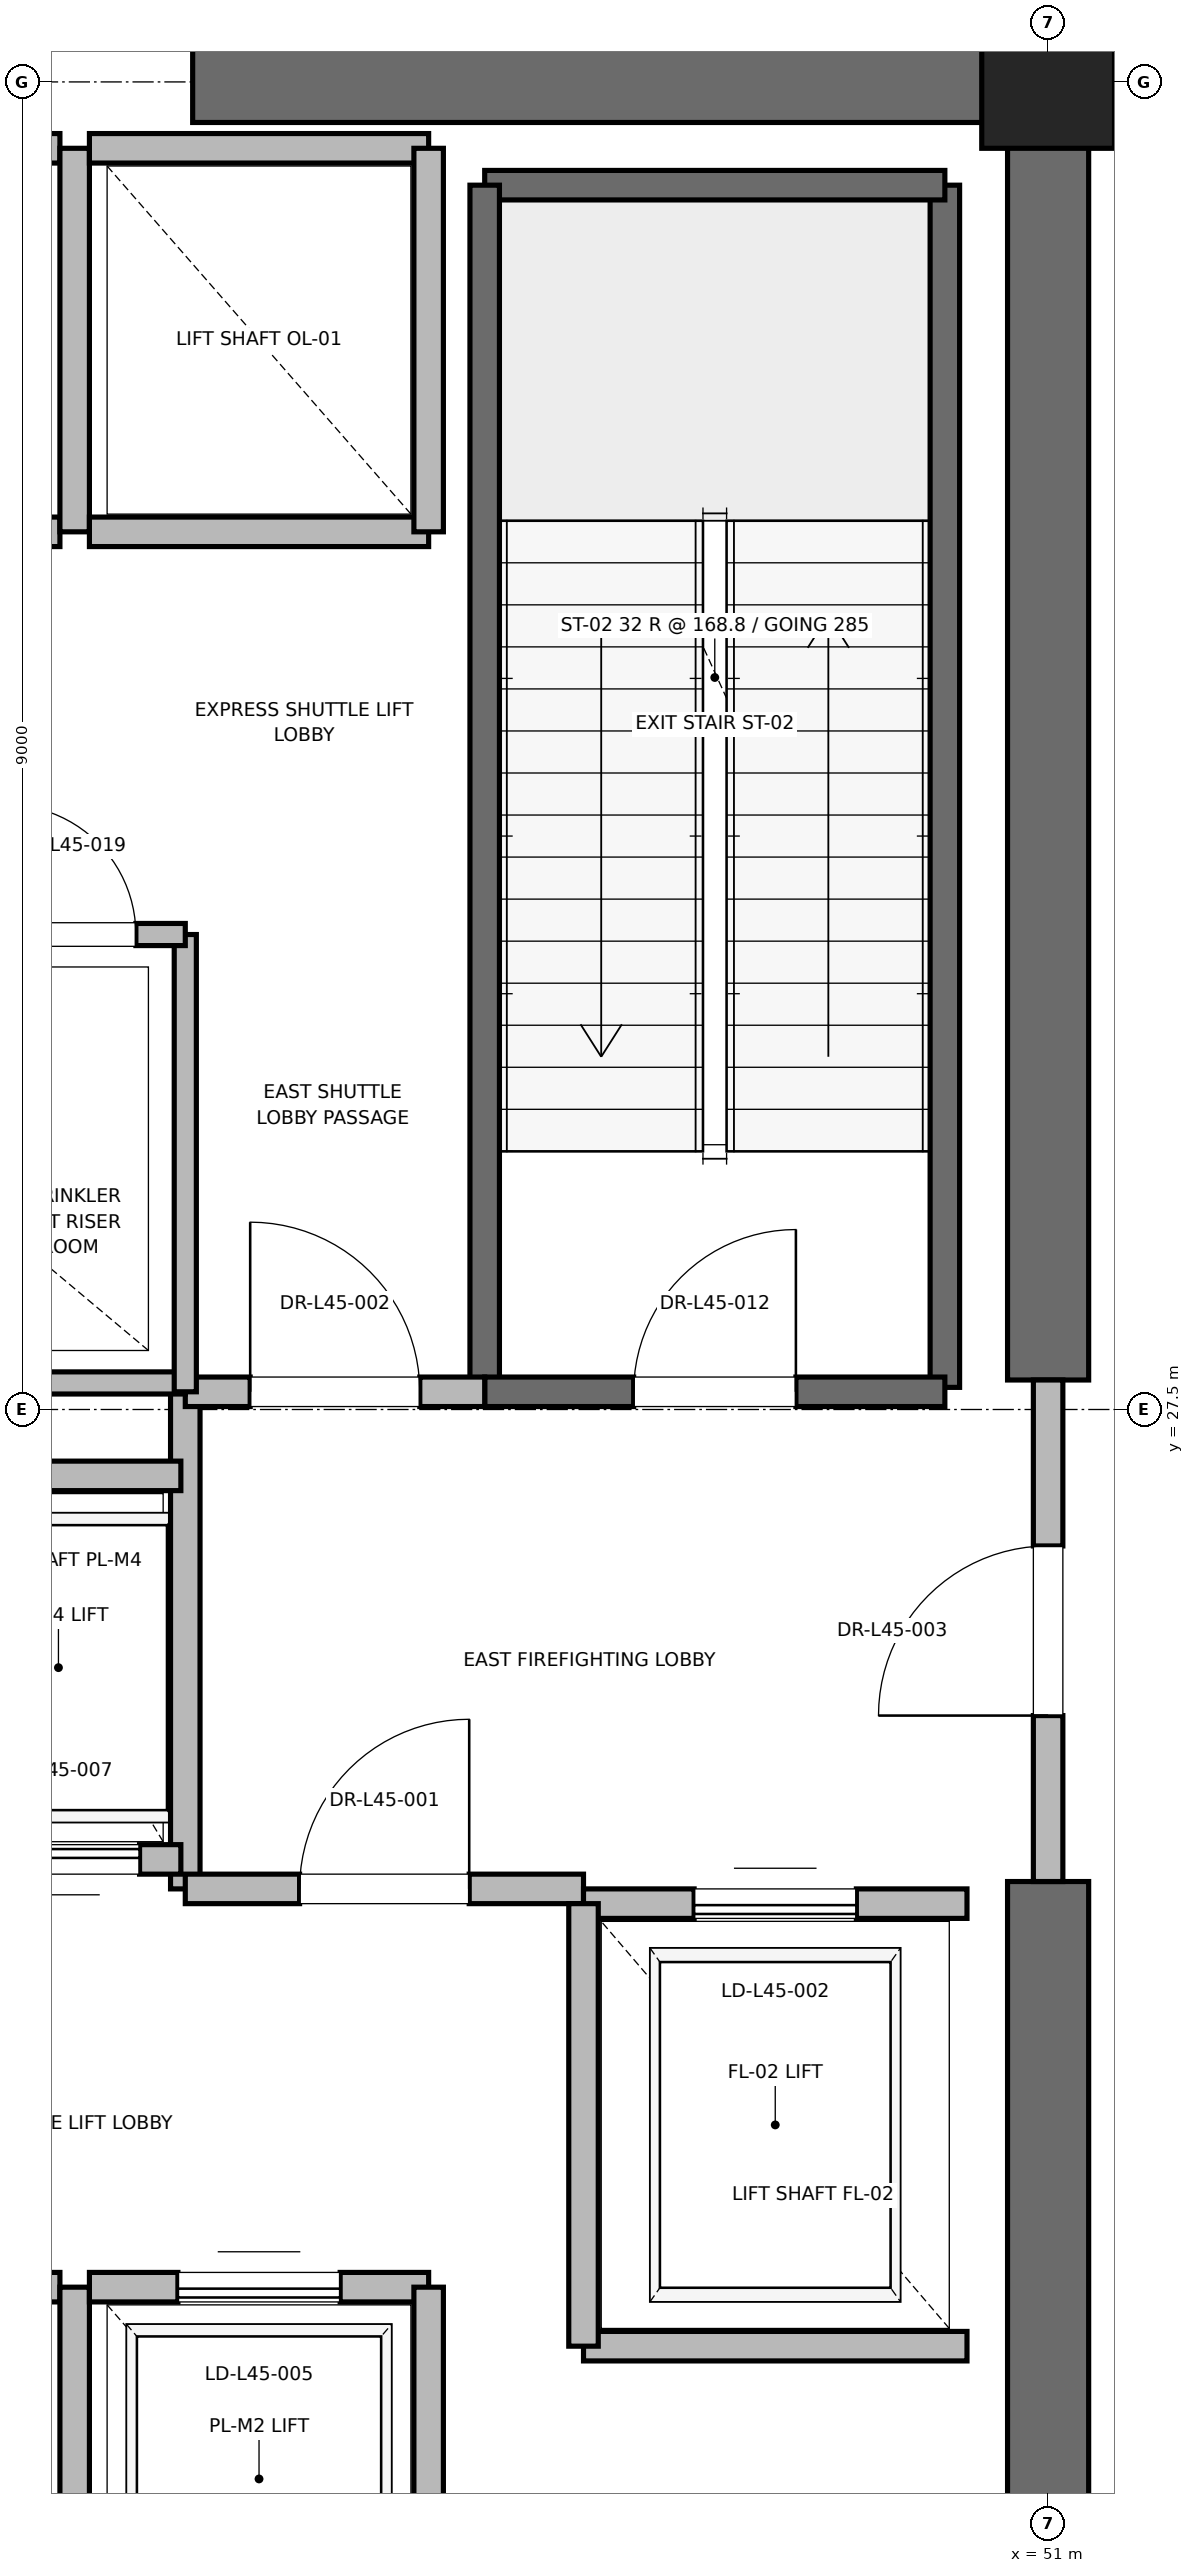
"""IFC4 building model, lengths in metres.
Left out: names, types, materials, properties, quantities, classifications, styles, units other than length and angle.
Written with IfcOpenShell. Run it as: python <this file> out.ifc"""

import sys

from ifc_helpers import new_model, si_unit, direction, frame, frame_2d, origin, origin_2d, place, context, subcontext, project, spatial, rectangle, extrude, element, fill, save


model = new_model("IFC4")
c1 = context("Model", 3, precision=1e-05, world=origin(), true_north=direction((0.0, 1.0)))
c2 = subcontext(c1, "Body", "Model", "MODEL_VIEW")
j1 = project(units=[si_unit("LENGTHUNIT", "METRE"), si_unit("PLANEANGLEUNIT", "RADIAN")], contexts=[c1])
p1 = place(None, origin())
s1 = spatial("IfcSite", under=j1, at=p1, CompositionType="ELEMENT")
p2 = place(p1, origin())
s2 = spatial("IfcBuilding", under=s1, at=p2, CompositionType="ELEMENT")
p3 = place(p2, frame((0.0, 0.0, 194.8)))
s3 = spatial("IfcBuildingStorey", under=s2, at=p3, CompositionType="ELEMENT", Elevation=194.8)
p4 = place(p3, frame((51.0, 36.5, 0.0), z_axis=(0.0, 0.0, 1.0), x_axis=(1.0, 0.0, 0.0)))
e1 = element("IfcColumn", 1, at=p4, inside=s3, PredefinedType="PILASTER", context=c2, shape_type="SweptSolid", body=[
    extrude(rectangle(XDim=0.9, YDim=0.9, at=origin_2d()), origin(), (0.0, 0.0, 1.0), 5.4),
])
for number, where, z_axis, x_axis in (
    (2, (45.2, 36.5, 0.0), (0.0, 0.0, 1.0), (1.0, 0.0, 0.0)),
    (3, (51.0, 18.5, 0.0), (0.0, 0.0, 1.0), (0.0, 1.0, 0.0)),
):
    element("IfcWall", number, at=place(p3, frame(where, z_axis=z_axis, x_axis=x_axis)), inside=s3, PredefinedType="SHEAR", context=c2, shape_type="SweptSolid", body=[
        extrude(rectangle(XDim=5.8, YDim=0.55, at=frame_2d((2.9, 0.0))), origin(), (0.0, 0.0, 1.0), 5.1),
    ])
p5 = place(p3, frame((51.0, 27.7, 0.0), z_axis=(0.0, 0.0, 1.0), x_axis=(0.0, 1.0, 0.0)))
e4 = element("IfcWall", 4, at=p5, inside=s3, PredefinedType="SHEAR", context=c2, shape_type="SweptSolid", body=[
    extrude(rectangle(XDim=8.8, YDim=0.55, at=frame_2d((4.4, 0.0))), origin(), (0.0, 0.0, 1.0), 5.1),
])
p6 = place(p3, frame((50.3, 27.65, 0.0), z_axis=(0.0, 0.0, 1.0), x_axis=(0.0, 1.0, 0.0)))
e5 = element("IfcWall", 5, at=p6, inside=s3, PredefinedType="SOLIDWALL", context=c2, shape_type="SweptSolid", body=[
    extrude(rectangle(XDim=8.15, YDim=0.2, at=frame_2d((4.075, 0.0))), origin(), (0.0, 0.0, 1.0), 5.1),
])
p7 = place(p3, frame((47.18, 35.8, 0.0), z_axis=(0.0, 0.0, 1.0), x_axis=(1.0, 0.0, 0.0)))
e6 = element("IfcWall", 6, at=p7, inside=s3, PredefinedType="SOLIDWALL", context=c2, shape_type="SweptSolid", body=[
    extrude(rectangle(XDim=3.12, YDim=0.2, at=frame_2d((1.56, 0.0))), origin(), (0.0, 0.0, 1.0), 5.1),
])
p8 = place(p3, frame((47.18, 27.62, 0.0), z_axis=(0.0, 0.0, 1.0), x_axis=(0.0, 1.0, 0.0)))
e7 = element("IfcWall", 7, at=p8, inside=s3, PredefinedType="SOLIDWALL", context=c2, shape_type="SweptSolid", body=[
    extrude(rectangle(XDim=8.18, YDim=0.2, at=frame_2d((4.09, 0.0))), origin(), (0.0, 0.0, 1.0), 5.1),
])
p9 = place(p3, frame((47.18, 27.62, 0.0), z_axis=(0.0, 0.0, 1.0), x_axis=(1.0, 0.0, 0.0)))
e8 = element("IfcWall", 8, at=p9, inside=s3, PredefinedType="SOLIDWALL", context=c2, shape_type="SweptSolid", body=[
    extrude(rectangle(XDim=3.12, YDim=0.2, at=frame_2d((1.56, 0.0))), origin(), (0.0, 0.0, 1.0), 5.1),
])
p10 = place(p9, frame((1.01, 0.0, 0.0)))
e9 = element("IfcOpeningElement", 9, at=p10, cuts=e8, PredefinedType="OPENING", context=c2, shape_type="SweptSolid", body=[
    extrude(rectangle(XDim=1.1, YDim=2.15, at=frame_2d((0.55, 1.075))), frame((0.0, 0.1, 0.0), z_axis=(0.0, -1.0, 0.0), x_axis=(1.0, 0.0, 0.0)), (0.0, 0.0, 1.0), 0.2),
])
p11 = place(p3, frame((45.15, 24.25, 0.0), z_axis=(0.0, 0.0, 1.0), x_axis=(0.0, 1.0, 0.0)))
e10 = element("IfcWall", 10, at=p11, inside=s3, PredefinedType="PARTITIONING", context=c2, shape_type="SweptSolid", body=[
    extrude(rectangle(XDim=3.37, YDim=0.2, at=frame_2d((1.685, 0.0))), origin(), (0.0, 0.0, 1.0), 5.1),
])
p12 = place(p3, frame((45.15, 24.25, 0.0), z_axis=(0.0, 0.0, 1.0), x_axis=(1.0, 0.0, 0.0)))
e11 = element("IfcWall", 11, at=p12, inside=s3, PredefinedType="PARTITIONING", context=c2, shape_type="SweptSolid", body=[
    extrude(rectangle(XDim=2.7, YDim=0.2, at=frame_2d((1.35, 0.0))), origin(), (0.0, 0.0, 1.0), 5.1),
])
p13 = place(p12, frame((0.775, 0.0, 0.0)))
e12 = element("IfcOpeningElement", 12, at=p13, cuts=e11, PredefinedType="OPENING", context=c2, shape_type="SweptSolid", body=[
    extrude(rectangle(XDim=1.15, YDim=2.2, at=frame_2d((0.575, 1.1))), frame((0.0, 0.1, 0.0), z_axis=(0.0, -1.0, 0.0), x_axis=(1.0, 0.0, 0.0)), (0.0, 0.0, 1.0), 0.2),
])
p14 = place(p3, frame((45.15, 27.62, 0.0), z_axis=(0.0, 0.0, 1.0), x_axis=(1.0, 0.0, 0.0)))
e13 = element("IfcWall", 13, at=p14, inside=s3, PredefinedType="PARTITIONING", context=c2, shape_type="SweptSolid", body=[
    extrude(rectangle(XDim=2.03, YDim=0.2, at=frame_2d((1.015, 0.0))), origin(), (0.0, 0.0, 1.0), 5.1),
])
p15 = place(p14, frame((0.44, 0.0, 0.0)))
e14 = element("IfcOpeningElement", 14, at=p15, cuts=e13, PredefinedType="OPENING", context=c2, shape_type="SweptSolid", body=[
    extrude(rectangle(XDim=1.15, YDim=2.2, at=frame_2d((0.575, 1.1))), frame((0.0, 0.1, 0.0), z_axis=(0.0, -1.0, 0.0), x_axis=(1.0, 0.0, 0.0)), (0.0, 0.0, 1.0), 0.2),
])
p16 = place(p3, frame((51.0, 24.3, 0.0), z_axis=(0.0, 0.0, 1.0), x_axis=(0.0, 1.0, 0.0)))
e15 = element("IfcWall", 15, at=p16, inside=s3, PredefinedType="PARTITIONING", context=c2, shape_type="SweptSolid", body=[
    extrude(rectangle(XDim=3.4, YDim=0.2, at=frame_2d((1.7, 0.0))), origin(), (0.0, 0.0, 1.0), 4.08),
])
p17 = place(p16, frame((1.125, 0.0, 0.0)))
e16 = element("IfcOpeningElement", 16, at=p17, cuts=e15, PredefinedType="OPENING", context=c2, shape_type="SweptSolid", body=[
    extrude(rectangle(XDim=1.15, YDim=2.2, at=frame_2d((0.575, 1.1))), frame((0.0, 0.1, 0.0), z_axis=(0.0, -1.0, 0.0), x_axis=(1.0, 0.0, 0.0)), (0.0, 0.0, 1.0), 0.2),
])
p18 = place(p3, frame((47.85, 21.15, 0.0), z_axis=(0.0, 0.0, 1.0), x_axis=(1.0, 0.0, 0.0)))
e17 = element("IfcWall", 17, at=p18, inside=s3, PredefinedType="SOLIDWALL", context=c2, shape_type="SweptSolid", body=[
    extrude(rectangle(XDim=2.6, YDim=0.2, at=frame_2d((1.3, 0.0))), origin(), (0.0, 0.0, 1.0), 5.1),
])
p19 = place(p3, frame((50.45, 24.15, 0.0), z_axis=(0.0, 0.0, 1.0), x_axis=(-1.0, 0.0, 0.0)))
e18 = element("IfcWall", 18, at=p19, inside=s3, PredefinedType="SOLIDWALL", context=c2, shape_type="SweptSolid", body=[
    extrude(rectangle(XDim=2.6, YDim=0.2, at=frame_2d((1.3, 0.0))), origin(), (0.0, 0.0, 1.0), 4.08),
])
p20 = place(p19, frame((0.75, 0.0, 0.0)))
e19 = element("IfcOpeningElement", 19, at=p20, cuts=e18, PredefinedType="OPENING", context=c2, shape_type="SweptSolid", body=[
    extrude(rectangle(XDim=1.1, YDim=2.2, at=frame_2d((0.55, 1.1))), frame((0.0, 0.1, 0.0), z_axis=(0.0, -1.0, 0.0), x_axis=(1.0, 0.0, 0.0)), (0.0, 0.0, 1.0), 0.2),
])
p21 = place(p3, frame((47.85, 24.15, 0.0), z_axis=(0.0, 0.0, 1.0), x_axis=(0.0, -1.0, 0.0)))
e20 = element("IfcWall", 20, at=p21, inside=s3, PredefinedType="SOLIDWALL", context=c2, shape_type="SweptSolid", body=[
    extrude(rectangle(XDim=3.0, YDim=0.2, at=frame_2d((1.5, 0.0))), origin(), (0.0, 0.0, 1.0), 5.1),
])
p22 = place(p3, frame((44.3, 21.55, 0.0), z_axis=(0.0, 0.0, 1.0), x_axis=(-1.0, 0.0, 0.0)))
e21 = element("IfcWall", 21, at=p22, inside=s3, PredefinedType="SOLIDWALL", context=c2, shape_type="SweptSolid", body=[
    extrude(rectangle(XDim=2.3, YDim=0.2, at=frame_2d((1.15, 0.0))), origin(), (0.0, 0.0, 1.0), 5.1),
])
p23 = place(p22, frame((0.6, 0.0, 0.0)))
e22 = element("IfcOpeningElement", 22, at=p23, cuts=e21, PredefinedType="OPENING", context=c2, shape_type="SweptSolid", body=[
    extrude(rectangle(XDim=1.1, YDim=2.2, at=frame_2d((0.55, 1.1))), frame((0.0, 0.1, 0.0), z_axis=(0.0, -1.0, 0.0), x_axis=(1.0, 0.0, 0.0)), (0.0, 0.0, 1.0), 0.2),
])
p24 = place(p3, frame((44.4, 18.95, 0.0), z_axis=(0.0, 0.0, 1.0), x_axis=(0.0, 1.0, 0.0)))
e23 = element("IfcWall", 23, at=p24, inside=s3, PredefinedType="SOLIDWALL", context=c2, shape_type="SweptSolid", body=[
    extrude(rectangle(XDim=2.6, YDim=0.2, at=frame_2d((1.3, 0.0))), origin(), (0.0, 0.0, 1.0), 5.1),
])
p25 = place(p3, frame((46.8, 21.55, 0.0), z_axis=(0.0, 0.0, 1.0), x_axis=(-1.0, 0.0, 0.0)))
e24 = element("IfcWall", 24, at=p25, inside=s3, PredefinedType="SOLIDWALL", context=c2, shape_type="SweptSolid", body=[
    extrude(rectangle(XDim=2.3, YDim=0.2, at=frame_2d((1.15, 0.0))), origin(), (0.0, 0.0, 1.0), 5.1),
])
p26 = place(p25, frame((0.6, 0.0, 0.0)))
e25 = element("IfcOpeningElement", 25, at=p26, cuts=e24, PredefinedType="OPENING", context=c2, shape_type="SweptSolid", body=[
    extrude(rectangle(XDim=1.1, YDim=2.2, at=frame_2d((0.55, 1.1))), frame((0.0, 0.1, 0.0), z_axis=(0.0, -1.0, 0.0), x_axis=(1.0, 0.0, 0.0)), (0.0, 0.0, 1.0), 0.2),
])
p27 = place(p3, frame((46.8, 18.95, 0.0), z_axis=(0.0, 0.0, 1.0), x_axis=(0.0, 1.0, 0.0)))
e26 = element("IfcWall", 26, at=p27, inside=s3, PredefinedType="SOLIDWALL", context=c2, shape_type="SweptSolid", body=[
    extrude(rectangle(XDim=2.6, YDim=0.2, at=frame_2d((1.3, 0.0))), origin(), (0.0, 0.0, 1.0), 5.1),
])
p28 = place(p3, frame((43.46, 24.45, 0.0), z_axis=(0.0, 0.0, 1.0), x_axis=(1.0, 0.0, 0.0)))
e27 = element("IfcWall", 27, at=p28, inside=s3, PredefinedType="SOLIDWALL", context=c2, shape_type="SweptSolid", body=[
    extrude(rectangle(XDim=1.66, YDim=0.2, at=frame_2d((0.83, 0.0))), origin(), (0.0, 0.0, 1.0), 5.1),
])
p29 = place(p28, frame((0.28, 0.0, 0.0)))
e28 = element("IfcOpeningElement", 28, at=p29, cuts=e27, PredefinedType="OPENING", context=c2, shape_type="SweptSolid", body=[
    extrude(rectangle(XDim=1.1, YDim=2.2, at=frame_2d((0.55, 1.1))), frame((0.0, 0.1, 0.0), z_axis=(0.0, -1.0, 0.0), x_axis=(1.0, 0.0, 0.0)), (0.0, 0.0, 1.0), 0.2),
])
p30 = place(p3, frame((45.12, 27.05, 0.0), z_axis=(0.0, 0.0, 1.0), x_axis=(-1.0, 0.0, 0.0)))
e29 = element("IfcWall", 29, at=p30, inside=s3, PredefinedType="SOLIDWALL", context=c2, shape_type="SweptSolid", body=[
    extrude(rectangle(XDim=1.66, YDim=0.2, at=frame_2d((0.83, 0.0))), origin(), (0.0, 0.0, 1.0), 5.1),
])
p31 = place(p3, frame((42.0, 33.45, 0.0), z_axis=(0.0, 0.0, 1.0), x_axis=(1.0, 0.0, 0.0)))
e30 = element("IfcWall", 30, at=p31, inside=s3, PredefinedType="SOLIDWALL", context=c2, shape_type="SweptSolid", body=[
    extrude(rectangle(XDim=2.3, YDim=0.2, at=frame_2d((1.15, 0.0))), origin(), (0.0, 0.0, 1.0), 5.1),
])
p32 = place(p3, frame((44.3, 36.05, 0.0), z_axis=(0.0, 0.0, 1.0), x_axis=(-1.0, 0.0, 0.0)))
e31 = element("IfcWall", 31, at=p32, inside=s3, PredefinedType="SOLIDWALL", context=c2, shape_type="SweptSolid", body=[
    extrude(rectangle(XDim=2.3, YDim=0.2, at=frame_2d((1.15, 0.0))), origin(), (0.0, 0.0, 1.0), 4.08),
])
p33 = place(p3, frame((44.4, 33.45, 0.0), z_axis=(0.0, 0.0, 1.0), x_axis=(0.0, 1.0, 0.0)))
e32 = element("IfcWall", 32, at=p33, inside=s3, PredefinedType="SOLIDWALL", context=c2, shape_type="SweptSolid", body=[
    extrude(rectangle(XDim=2.6, YDim=0.2, at=frame_2d((1.3, 0.0))), origin(), (0.0, 0.0, 1.0), 4.08),
])
p34 = place(p3, frame((44.5, 33.45, 0.0), z_axis=(0.0, 0.0, 1.0), x_axis=(1.0, 0.0, 0.0)))
e33 = element("IfcWall", 33, at=p34, inside=s3, PredefinedType="SOLIDWALL", context=c2, shape_type="SweptSolid", body=[
    extrude(rectangle(XDim=2.3, YDim=0.2, at=frame_2d((1.15, 0.0))), origin(), (0.0, 0.0, 1.0), 5.1),
])
p35 = place(p3, frame((46.8, 36.05, 0.0), z_axis=(0.0, 0.0, 1.0), x_axis=(-1.0, 0.0, 0.0)))
e34 = element("IfcWall", 34, at=p35, inside=s3, PredefinedType="SOLIDWALL", context=c2, shape_type="SweptSolid", body=[
    extrude(rectangle(XDim=2.3, YDim=0.2, at=frame_2d((1.15, 0.0))), origin(), (0.0, 0.0, 1.0), 4.08),
])
p36 = place(p3, frame((46.8, 33.45, 0.0), z_axis=(0.0, 0.0, 1.0), x_axis=(0.0, 1.0, 0.0)))
e35 = element("IfcWall", 35, at=p36, inside=s3, PredefinedType="SOLIDWALL", context=c2, shape_type="SweptSolid", body=[
    extrude(rectangle(XDim=2.6, YDim=0.2, at=frame_2d((1.3, 0.0))), origin(), (0.0, 0.0, 1.0), 5.1),
])
p37 = place(p3, frame((41.56, 27.68, 0.0), z_axis=(0.0, 0.0, 1.0), x_axis=(1.0, 0.0, 0.0)))
e36 = element("IfcWall", 36, at=p37, inside=s3, PredefinedType="PARTITIONING", context=c2, shape_type="SweptSolid", body=[
    extrude(rectangle(XDim=3.59, YDim=0.15, at=frame_2d((1.795, 0.0))), origin(), (0.0, 0.0, 1.0), 2.85),
])
p38 = place(p3, frame((45.15, 27.62, 0.0), z_axis=(0.0, 0.0, 1.0), x_axis=(0.0, 1.0, 0.0)))
e37 = element("IfcWall", 37, at=p38, inside=s3, PredefinedType="PARTITIONING", context=c2, shape_type="SweptSolid", body=[
    extrude(rectangle(XDim=3.1, YDim=0.15, at=frame_2d((1.55, 0.0))), origin(), (0.0, 0.0, 1.0), 2.85),
])
p39 = place(p3, frame((43.6, 30.72, 0.0), z_axis=(0.0, 0.0, 1.0), x_axis=(1.0, 0.0, 0.0)))
e38 = element("IfcWall", 38, at=p39, inside=s3, PredefinedType="PARTITIONING", context=c2, shape_type="SweptSolid", body=[
    extrude(rectangle(XDim=1.55, YDim=0.15, at=frame_2d((0.775, 0.0))), origin(), (0.0, 0.0, 1.0), 2.85),
])
p40 = place(p39, frame((0.335, 0.0, 0.0)))
e39 = element("IfcOpeningElement", 39, at=p40, cuts=e38, PredefinedType="OPENING", context=c2, shape_type="SweptSolid", body=[
    extrude(rectangle(XDim=0.88, YDim=2.1, at=frame_2d((0.44, 1.05))), frame((0.0, 0.075, 0.0), z_axis=(0.0, -1.0, 0.0), x_axis=(1.0, 0.0, 0.0)), (0.0, 0.0, 1.0), 0.15),
])
p41 = place(p10, origin())
e40 = element("IfcDoor", 40, at=p41, inside=s3, OperationType="SINGLE_SWING_RIGHT", PredefinedType="DOOR", context=c2, shape_type="SweptSolid", body=[
    extrude(rectangle(XDim=1.1, YDim=2.15, at=frame_2d((0.55, 1.075))), frame((0.0, 0.025, 0.0), z_axis=(0.0, -1.0, 0.0), x_axis=(1.0, 0.0, 0.0)), (0.0, 0.0, 1.0), 0.05),
])
fill(e9, e40)
p42 = place(p13, origin())
e41 = element("IfcDoor", 41, at=p42, inside=s3, OperationType="SINGLE_SWING_RIGHT", PredefinedType="DOOR", context=c2, shape_type="SweptSolid", body=[
    extrude(rectangle(XDim=1.15, YDim=2.2, at=frame_2d((0.575, 1.1))), frame((0.0, 0.025, 0.0), z_axis=(0.0, -1.0, 0.0), x_axis=(1.0, 0.0, 0.0)), (0.0, 0.0, 1.0), 0.05),
])
fill(e12, e41)
p43 = place(p15, origin())
e42 = element("IfcDoor", 42, at=p43, inside=s3, OperationType="SINGLE_SWING_LEFT", PredefinedType="DOOR", context=c2, shape_type="SweptSolid", body=[
    extrude(rectangle(XDim=1.15, YDim=2.2, at=frame_2d((0.575, 1.1))), frame((0.0, 0.025, 0.0), z_axis=(0.0, -1.0, 0.0), x_axis=(1.0, 0.0, 0.0)), (0.0, 0.0, 1.0), 0.05),
])
fill(e14, e42)
p44 = place(p17, origin())
e43 = element("IfcDoor", 43, at=p44, inside=s3, OperationType="SINGLE_SWING_LEFT", PredefinedType="DOOR", context=c2, shape_type="SweptSolid", body=[
    extrude(rectangle(XDim=1.15, YDim=2.2, at=frame_2d((0.575, 1.1))), frame((0.0, 0.025, 0.0), z_axis=(0.0, -1.0, 0.0), x_axis=(1.0, 0.0, 0.0)), (0.0, 0.0, 1.0), 0.05),
])
fill(e16, e43)
p45 = place(p20, origin())
e44 = element("IfcDoor", 44, at=p45, inside=s3, OperationType="SLIDING_TO_RIGHT", PredefinedType="DOOR", context=c2, shape_type="SweptSolid", body=[
    extrude(rectangle(XDim=1.1, YDim=2.2, at=frame_2d((0.55, 1.1))), frame((0.0, 0.025, 0.0), z_axis=(0.0, -1.0, 0.0), x_axis=(1.0, 0.0, 0.0)), (0.0, 0.0, 1.0), 0.05),
])
fill(e19, e44)
p46 = place(p26, origin())
e45 = element("IfcDoor", 45, at=p46, inside=s3, OperationType="SLIDING_TO_RIGHT", PredefinedType="DOOR", context=c2, shape_type="SweptSolid", body=[
    extrude(rectangle(XDim=1.1, YDim=2.2, at=frame_2d((0.55, 1.1))), frame((0.0, 0.025, 0.0), z_axis=(0.0, -1.0, 0.0), x_axis=(1.0, 0.0, 0.0)), (0.0, 0.0, 1.0), 0.05),
])
fill(e25, e45)
p47 = place(p29, origin())
e46 = element("IfcDoor", 46, at=p47, inside=s3, OperationType="SLIDING_TO_RIGHT", PredefinedType="DOOR", context=c2, shape_type="SweptSolid", body=[
    extrude(rectangle(XDim=1.1, YDim=2.2, at=frame_2d((0.55, 1.1))), frame((0.0, 0.025, 0.0), z_axis=(0.0, -1.0, 0.0), x_axis=(1.0, 0.0, 0.0)), (0.0, 0.0, 1.0), 0.05),
])
fill(e28, e46)
p48 = place(p40, origin())
e47 = element("IfcDoor", 47, at=p48, inside=s3, OperationType="SINGLE_SWING_LEFT", PredefinedType="DOOR", context=c2, shape_type="SweptSolid", body=[
    extrude(rectangle(XDim=0.88, YDim=2.1, at=frame_2d((0.44, 1.05))), frame((0.0, 0.025, 0.0), z_axis=(0.0, -1.0, 0.0), x_axis=(1.0, 0.0, 0.0)), (0.0, 0.0, 1.0), 0.05),
])
fill(e39, e47)
save(model, sys.argv[1])
